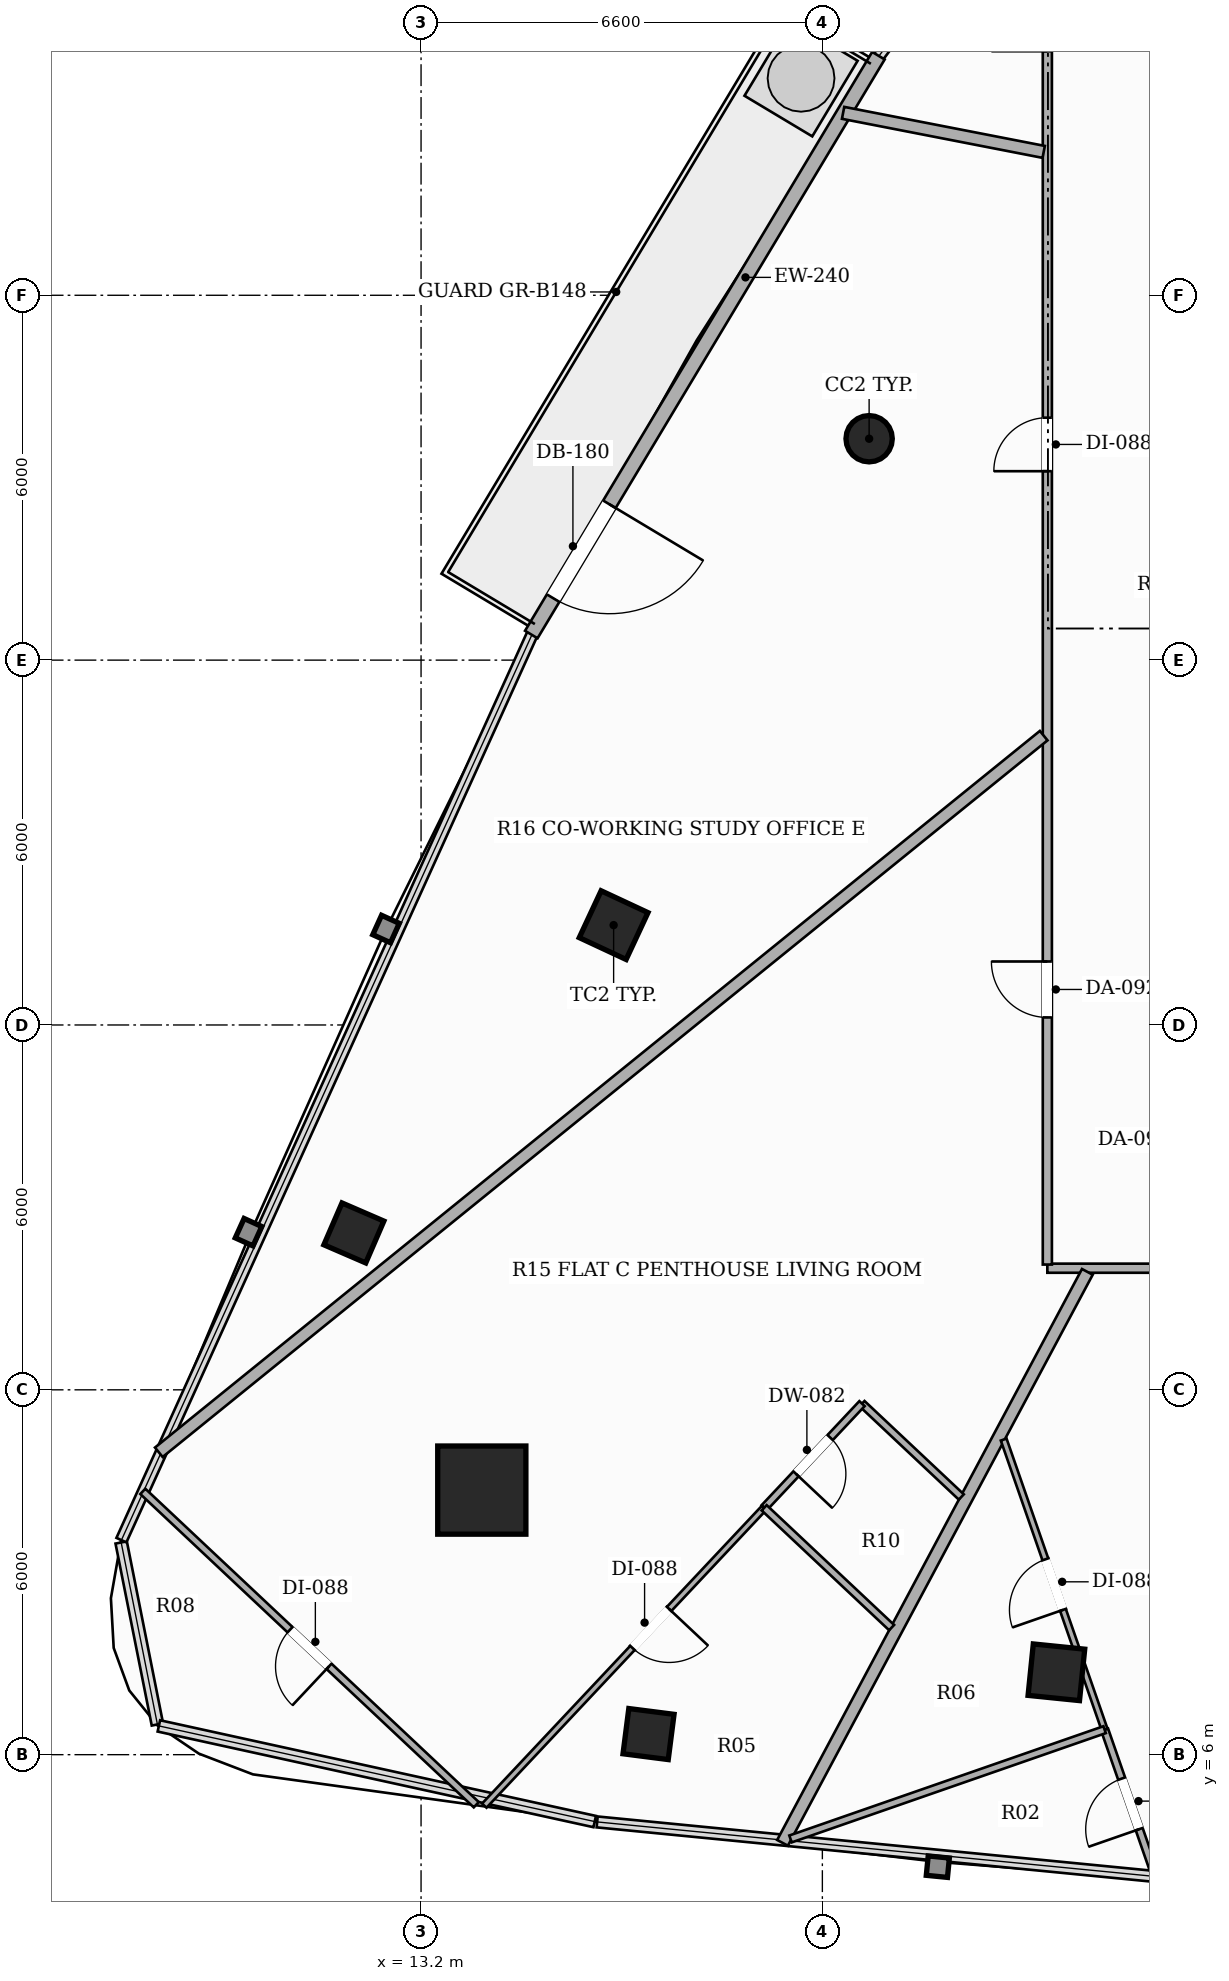
"""IFC4 building model, lengths in metres.
Left out: names, types, materials, properties, quantities, classifications, styles, units other than length and angle.
Written with IfcOpenShell. Run it as: python <this file> out.ifc"""

import sys

from ifc_helpers import new_model, si_unit, direction, frame, frame_2d, origin, origin_2d, place, context, subcontext, project, spatial, rectangle, hollow_rectangle, hollow_circle, extrude, element, fill, save


model = new_model("IFC4")
c1 = context("Model", 3, precision=1e-05, world=origin(), true_north=direction((0.0, 1.0)))
c2 = subcontext(c1, "Body", "Model", "MODEL_VIEW")
j1 = project(units=[si_unit("LENGTHUNIT", "METRE"), si_unit("PLANEANGLEUNIT", "RADIAN")], contexts=[c1])
p1 = place(None, origin())
s1 = spatial("IfcSite", under=j1, at=p1, CompositionType="ELEMENT")
p2 = place(p1, origin())
s2 = spatial("IfcBuilding", under=s1, at=p2, CompositionType="ELEMENT")
p3 = place(p2, frame((0.0, 0.0, 160.55)))
s3 = spatial("IfcBuildingStorey", under=s2, at=p3, CompositionType="ELEMENT", Elevation=160.55)
p4 = place(p3, frame((14.199, 10.351, 0.0), z_axis=(0.0, 0.0, 1.0), x_axis=(1.0, 0.0, 0.0)))
e1 = element("IfcColumn", 1, at=p4, inside=s3, PredefinedType="COLUMN", context=c2, shape_type="SweptSolid", body=[
    extrude(hollow_rectangle(XDim=1.45, YDim=1.45, WallThickness=0.045, at=origin_2d()), origin(), (0.0, 0.0, 1.0), 3.3),
])
p5 = place(p3, frame((20.569, 27.641, 0.0), z_axis=(0.0, 0.0, 1.0), x_axis=(1.0, 0.0, 0.0)))
e2 = element("IfcColumn", 2, at=p5, inside=s3, PredefinedType="COLUMN", context=c2, shape_type="SweptSolid", body=[
    extrude(hollow_circle(Radius=0.381, WallThickness=0.022, at=origin_2d()), origin(), (0.0, 0.0, 1.0), 3.3),
])
for number, where, z_axis, x_axis in (
    (3, (16.367, 19.642, 0.0), (0.0, 0.0, 1.0), (0.423, 0.906, 0.0)),
    (4, (23.649, 7.355, 0.0), (0.0, 0.0, 1.0), (-0.995, 0.101, 0.0)),
):
    element("IfcColumn", number, at=place(p3, frame(where, z_axis=z_axis, x_axis=x_axis)), inside=s3, PredefinedType="COLUMN", context=c2, shape_type="SweptSolid", body=[
        extrude(hollow_rectangle(XDim=0.85, YDim=0.85, WallThickness=0.028, at=origin_2d()), origin(), (0.0, 0.0, 1.0), 3.3),
    ])
for number, where, z_axis, x_axis in (
    (5, (12.095, 14.58, 0.0), (0.0, 0.0, 1.0), (0.397, 0.918, 0.0)),
    (6, (16.941, 6.339, 0.0), (0.0, 0.0, 1.0), (-0.992, 0.127, 0.0)),
):
    element("IfcColumn", number, at=place(p3, frame(where, z_axis=z_axis, x_axis=x_axis)), inside=s3, PredefinedType="COLUMN", context=c2, shape_type="SweptSolid", body=[
        extrude(hollow_rectangle(XDim=0.75, YDim=0.75, WallThickness=0.025, at=origin_2d()), origin(), (0.0, 0.0, 1.0), 3.3),
    ])
p6 = place(p3, frame((20.722, 33.94, 0.0), z_axis=(0.0, 0.0, 1.0), x_axis=(-0.514334017412, -0.85758994778, 0.0)))
e7 = element("IfcWall", 7, at=p6, inside=s3, PredefinedType="SOLIDWALL", context=c2, shape_type="SweptSolid", body=[
    extrude(rectangle(XDim=11.1, YDim=0.24, at=frame_2d((5.55, 0.0))), origin(), (0.0, 0.0, 1.0), 2.624),
])
p7 = place(p6, frame((8.602, 0.0, 0.0)))
e8 = element("IfcOpeningElement", 8, at=p7, cuts=e7, PredefinedType="OPENING", context=c2, shape_type="SweptSolid", body=[
    extrude(rectangle(XDim=1.8, YDim=2.2, at=frame_2d((0.9, 1.1))), frame((0.0, 0.13, 0.0), z_axis=(0.0, -1.0, 0.0), x_axis=(1.0, 0.0, 0.0)), (0.0, 0.0, 1.0), 0.26),
])
p8 = place(p3, frame((26.09, 14.0, 0.0), z_axis=(0.0, 0.0, 1.0), x_axis=(-1.0, 0.0, 0.0)))
e9 = element("IfcWall", 9, at=p8, inside=s3, PredefinedType="PARTITIONING", context=c2, shape_type="SweptSolid", body=[
    extrude(rectangle(XDim=2.59, YDim=0.15, at=frame_2d((1.295, 0.0))), origin(), (0.0, 0.0, 1.0), 2.721),
])
p9 = place(p3, frame((23.5, 14.06, 0.0), z_axis=(0.0, 0.0, 1.0), x_axis=(0.0, 1.0, 0.0)))
e10 = element("IfcWall", 10, at=p9, inside=s3, PredefinedType="PARTITIONING", context=c2, shape_type="SweptSolid", body=[
    extrude(rectangle(XDim=22.84, YDim=0.15, at=frame_2d((11.42, 0.0))), origin(), (0.0, 0.0, 1.0), 2.413),
])
p10 = place(p9, frame((4.064, 0.0, 0.0)))
e11 = element("IfcOpeningElement", 11, at=p10, cuts=e10, PredefinedType="OPENING", context=c2, shape_type="SweptSolid", body=[
    extrude(rectangle(XDim=0.92, YDim=2.15, at=frame_2d((0.46, 1.075))), frame((0.0, 0.085, 0.0), z_axis=(0.0, -1.0, 0.0), x_axis=(1.0, 0.0, 0.0)), (0.0, 0.0, 1.0), 0.17),
])
p11 = place(p9, frame((13.047, 0.0, 0.0)))
e12 = element("IfcOpeningElement", 12, at=p11, cuts=e10, PredefinedType="OPENING", context=c2, shape_type="SweptSolid", body=[
    extrude(rectangle(XDim=0.88, YDim=2.1, at=frame_2d((0.44, 1.05))), frame((0.0, 0.085, 0.0), z_axis=(0.0, -1.0, 0.0), x_axis=(1.0, 0.0, 0.0)), (0.0, 0.0, 1.0), 0.17),
])
p12 = place(p9, frame((19.953, 0.0, 0.0)))
e13 = element("IfcOpeningElement", 13, at=p12, cuts=e10, PredefinedType="OPENING", context=c2, shape_type="SweptSolid", body=[
    extrude(rectangle(XDim=0.92, YDim=2.15, at=frame_2d((0.46, 1.075))), frame((0.0, 0.085, 0.0), z_axis=(0.0, -1.0, 0.0), x_axis=(1.0, 0.0, 0.0)), (0.0, 0.0, 1.0), 0.17),
])
p13 = place(p3, frame((19.145, 4.55, 0.0), z_axis=(0.0, 0.0, 1.0), x_axis=(0.470953669838, 0.882157945533, 0.0)))
e14 = element("IfcWall", 14, at=p13, inside=s3, PredefinedType="PARTITIONING", context=c2, shape_type="SweptSolid", body=[
    extrude(rectangle(XDim=10.644, YDim=0.2, at=frame_2d((5.322, 0.0))), origin(), (0.0, 0.0, 1.0), 2.413),
])
p14 = place(p3, frame((8.887, 10.973, 0.0), z_axis=(0.0, 0.0, 1.0), x_axis=(0.777135864284, 0.629332859815, 0.0)))
e15 = element("IfcWall", 15, at=p14, inside=s3, PredefinedType="PARTITIONING", context=c2, shape_type="SweptSolid", body=[
    extrude(rectangle(XDim=18.726, YDim=0.2, at=frame_2d((9.363, 0.0))), origin(), (0.0, 0.0, 1.0), 2.413),
])
p15 = place(p3, frame((20.141, 33.0, 0.0), z_axis=(0.0, 0.0, 1.0), x_axis=(0.981579076432, -0.191056318163, 0.0)))
e16 = element("IfcWall", 16, at=p15, inside=s3, PredefinedType="PARTITIONING", context=c2, shape_type="SweptSolid", body=[
    extrude(rectangle(XDim=3.361, YDim=0.2, at=frame_2d((1.68, 0.0))), origin(), (0.0, 0.0, 1.0), 2.413),
])
p16 = place(p3, frame((25.291, 3.969, 0.0), z_axis=(0.0, 0.0, 1.0), x_axis=(-0.328440044658, 0.944524820778, 0.0)))
e17 = element("IfcWall", 17, at=p16, inside=s3, PredefinedType="PARTITIONING", context=c2, shape_type="SweptSolid", body=[
    extrude(rectangle(XDim=2.585, YDim=0.12, at=frame_2d((1.292, 0.0))), origin(), (0.0, 0.0, 1.0), 3.06),
])
p17 = place(p16, frame((0.853, 0.0, 0.0)))
e18 = element("IfcOpeningElement", 18, at=p17, cuts=e17, PredefinedType="OPENING", context=c2, shape_type="SweptSolid", body=[
    extrude(rectangle(XDim=0.88, YDim=2.1, at=frame_2d((0.44, 1.05))), frame((0.0, 0.07, 0.0), z_axis=(0.0, -1.0, 0.0), x_axis=(1.0, 0.0, 0.0)), (0.0, 0.0, 1.0), 0.14),
])
p18 = place(p3, frame((24.442, 6.411, 0.0), z_axis=(0.0, 0.0, 1.0), x_axis=(-0.328597479572, 0.944470061155, 0.0)))
e19 = element("IfcWall", 19, at=p18, inside=s3, PredefinedType="PARTITIONING", context=c2, shape_type="SweptSolid", body=[
    extrude(rectangle(XDim=5.052, YDim=0.1, at=frame_2d((2.526, 0.0))), origin(), (0.0, 0.0, 1.0), 2.413),
])
p19 = place(p18, frame((2.086, 0.0, 0.0)))
e20 = element("IfcOpeningElement", 20, at=p19, cuts=e19, PredefinedType="OPENING", context=c2, shape_type="SweptSolid", body=[
    extrude(rectangle(XDim=0.88, YDim=2.1, at=frame_2d((0.44, 1.05))), frame((0.0, 0.06, 0.0), z_axis=(0.0, -1.0, 0.0), x_axis=(1.0, 0.0, 0.0)), (0.0, 0.0, 1.0), 0.12),
])
p20 = place(p3, frame((19.276, 4.614, 0.0), z_axis=(0.0, 0.0, 1.0), x_axis=(0.944496796706, 0.328520624941, 0.0)))
e21 = element("IfcWall", 21, at=p20, inside=s3, PredefinedType="PARTITIONING", context=c2, shape_type="SweptSolid", body=[
    extrude(rectangle(XDim=5.469, YDim=0.12, at=frame_2d((2.735, 0.0))), origin(), (0.0, 0.0, 1.0), 2.619),
])
p21 = place(p3, frame((22.085, 10.238, 0.0), z_axis=(0.0, 0.0, 1.0), x_axis=(-0.728663547615, 0.684871837921, 0.0)))
e22 = element("IfcWall", 22, at=p21, inside=s3, PredefinedType="PARTITIONING", context=c2, shape_type="SweptSolid", body=[
    extrude(rectangle(XDim=2.241, YDim=0.12, at=frame_2d((1.121, 0.0))), origin(), (0.0, 0.0, 1.0), 2.721),
])
p22 = place(p3, frame((20.452, 11.773, 0.0), z_axis=(0.0, 0.0, 1.0), x_axis=(-0.684631978878, -0.728888917118, 0.0)))
e23 = element("IfcWall", 23, at=p22, inside=s3, PredefinedType="PARTITIONING", context=c2, shape_type="SweptSolid", body=[
    extrude(rectangle(XDim=2.35, YDim=0.12, at=frame_2d((1.175, 0.0))), origin(), (0.0, 0.0, 1.0), 2.721),
])
p23 = place(p22, frame((0.765, 0.0, 0.0)))
e24 = element("IfcOpeningElement", 24, at=p23, cuts=e23, PredefinedType="OPENING", context=c2, shape_type="SweptSolid", body=[
    extrude(rectangle(XDim=0.82, YDim=2.1, at=frame_2d((0.41, 1.05))), frame((0.0, 0.07, 0.0), z_axis=(0.0, -1.0, 0.0), x_axis=(1.0, 0.0, 0.0)), (0.0, 0.0, 1.0), 0.14),
])
p24 = place(p3, frame((14.108, 5.177, 0.0), z_axis=(0.0, 0.0, 1.0), x_axis=(-0.728745526687, 0.684784606525, 0.0)))
e25 = element("IfcWall", 25, at=p24, inside=s3, PredefinedType="PARTITIONING", context=c2, shape_type="SweptSolid", body=[
    extrude(rectangle(XDim=7.525, YDim=0.12, at=frame_2d((3.763, 0.0))), origin(), (0.0, 0.0, 1.0), 3.06),
])
p25 = place(p24, frame((3.323, 0.0, 0.0)))
e26 = element("IfcOpeningElement", 26, at=p25, cuts=e25, PredefinedType="OPENING", context=c2, shape_type="SweptSolid", body=[
    extrude(rectangle(XDim=0.88, YDim=2.1, at=frame_2d((0.44, 1.05))), frame((0.0, 0.07, 0.0), z_axis=(0.0, -1.0, 0.0), x_axis=(1.0, 0.0, 0.0)), (0.0, 0.0, 1.0), 0.14),
])
p26 = place(p3, frame((18.843, 10.06, 0.0), z_axis=(0.0, 0.0, 1.0), x_axis=(-0.6848274704, -0.728705246163, 0.0)))
e27 = element("IfcWall", 27, at=p26, inside=s3, PredefinedType="PARTITIONING", context=c2, shape_type="SweptSolid", body=[
    extrude(rectangle(XDim=6.721, YDim=0.1, at=frame_2d((3.361, 0.0))), origin(), (0.0, 0.0, 1.0), 2.413),
])
p27 = place(p26, frame((2.283, 0.0, 0.0)))
e28 = element("IfcOpeningElement", 28, at=p27, cuts=e27, PredefinedType="OPENING", context=c2, shape_type="SweptSolid", body=[
    extrude(rectangle(XDim=0.88, YDim=2.1, at=frame_2d((0.44, 1.05))), frame((0.0, 0.06, 0.0), z_axis=(0.0, -1.0, 0.0), x_axis=(1.0, 0.0, 0.0)), (0.0, 0.0, 1.0), 0.12),
])
p28 = place(p3, frame((20.939, 8.09, 0.0), z_axis=(0.0, 0.0, 1.0), x_axis=(-0.728665789254, 0.68486945294, 0.0)))
e29 = element("IfcWall", 29, at=p28, inside=s3, PredefinedType="PARTITIONING", context=c2, shape_type="SweptSolid", body=[
    extrude(rectangle(XDim=2.876, YDim=0.12, at=frame_2d((1.438, 0.0))), origin(), (0.0, 0.0, 1.0), 2.721),
])
p29 = place(p7, origin())
e30 = element("IfcDoor", 30, at=p29, inside=s3, OperationType="SINGLE_SWING_LEFT", PredefinedType="DOOR", context=c2, shape_type="SweptSolid", body=[
    extrude(rectangle(XDim=1.8, YDim=2.2, at=frame_2d((0.9, 1.1))), frame((0.0, 0.025, 0.0), z_axis=(0.0, -1.0, 0.0), x_axis=(1.0, 0.0, 0.0)), (0.0, 0.0, 1.0), 0.05),
])
fill(e8, e30)
p30 = place(p17, origin())
e31 = element("IfcDoor", 31, at=p30, inside=s3, OperationType="SINGLE_SWING_LEFT", PredefinedType="DOOR", context=c2, shape_type="SweptSolid", body=[
    extrude(rectangle(XDim=0.88, YDim=2.1, at=frame_2d((0.44, 1.05))), frame((0.0, 0.025, 0.0), z_axis=(0.0, -1.0, 0.0), x_axis=(1.0, 0.0, 0.0)), (0.0, 0.0, 1.0), 0.05),
])
fill(e18, e31)
p31 = place(p19, origin())
e32 = element("IfcDoor", 32, at=p31, inside=s3, OperationType="SINGLE_SWING_LEFT", PredefinedType="DOOR", context=c2, shape_type="SweptSolid", body=[
    extrude(rectangle(XDim=0.88, YDim=2.1, at=frame_2d((0.44, 1.05))), frame((0.0, 0.025, 0.0), z_axis=(0.0, -1.0, 0.0), x_axis=(1.0, 0.0, 0.0)), (0.0, 0.0, 1.0), 0.05),
])
fill(e20, e32)
p32 = place(p10, origin())
e33 = element("IfcDoor", 33, at=p32, inside=s3, OperationType="SINGLE_SWING_RIGHT", PredefinedType="DOOR", context=c2, shape_type="SweptSolid", body=[
    extrude(rectangle(XDim=0.92, YDim=2.15, at=frame_2d((0.46, 1.075))), frame((0.0, 0.025, 0.0), z_axis=(0.0, -1.0, 0.0), x_axis=(1.0, 0.0, 0.0)), (0.0, 0.0, 1.0), 0.05),
])
fill(e11, e33)
p33 = place(p23, origin())
e34 = element("IfcDoor", 34, at=p33, inside=s3, OperationType="SINGLE_SWING_RIGHT", PredefinedType="DOOR", context=c2, shape_type="SweptSolid", body=[
    extrude(rectangle(XDim=0.82, YDim=2.1, at=frame_2d((0.41, 1.05))), frame((0.0, 0.025, 0.0), z_axis=(0.0, -1.0, 0.0), x_axis=(1.0, 0.0, 0.0)), (0.0, 0.0, 1.0), 0.05),
])
fill(e24, e34)
p34 = place(p25, origin())
e35 = element("IfcDoor", 35, at=p34, inside=s3, OperationType="SINGLE_SWING_LEFT", PredefinedType="DOOR", context=c2, shape_type="SweptSolid", body=[
    extrude(rectangle(XDim=0.88, YDim=2.1, at=frame_2d((0.44, 1.05))), frame((0.0, 0.025, 0.0), z_axis=(0.0, -1.0, 0.0), x_axis=(1.0, 0.0, 0.0)), (0.0, 0.0, 1.0), 0.05),
])
fill(e26, e35)
p35 = place(p27, origin())
e36 = element("IfcDoor", 36, at=p35, inside=s3, OperationType="SINGLE_SWING_LEFT", PredefinedType="DOOR", context=c2, shape_type="SweptSolid", body=[
    extrude(rectangle(XDim=0.88, YDim=2.1, at=frame_2d((0.44, 1.05))), frame((0.0, 0.025, 0.0), z_axis=(0.0, -1.0, 0.0), x_axis=(1.0, 0.0, 0.0)), (0.0, 0.0, 1.0), 0.05),
])
fill(e28, e36)
p36 = place(p11, origin())
e37 = element("IfcDoor", 37, at=p36, inside=s3, OperationType="SINGLE_SWING_LEFT", PredefinedType="DOOR", context=c2, shape_type="SweptSolid", body=[
    extrude(rectangle(XDim=0.88, YDim=2.1, at=frame_2d((0.44, 1.05))), frame((0.0, 0.025, 0.0), z_axis=(0.0, -1.0, 0.0), x_axis=(1.0, 0.0, 0.0)), (0.0, 0.0, 1.0), 0.05),
])
fill(e12, e37)
save(model, sys.argv[1])
